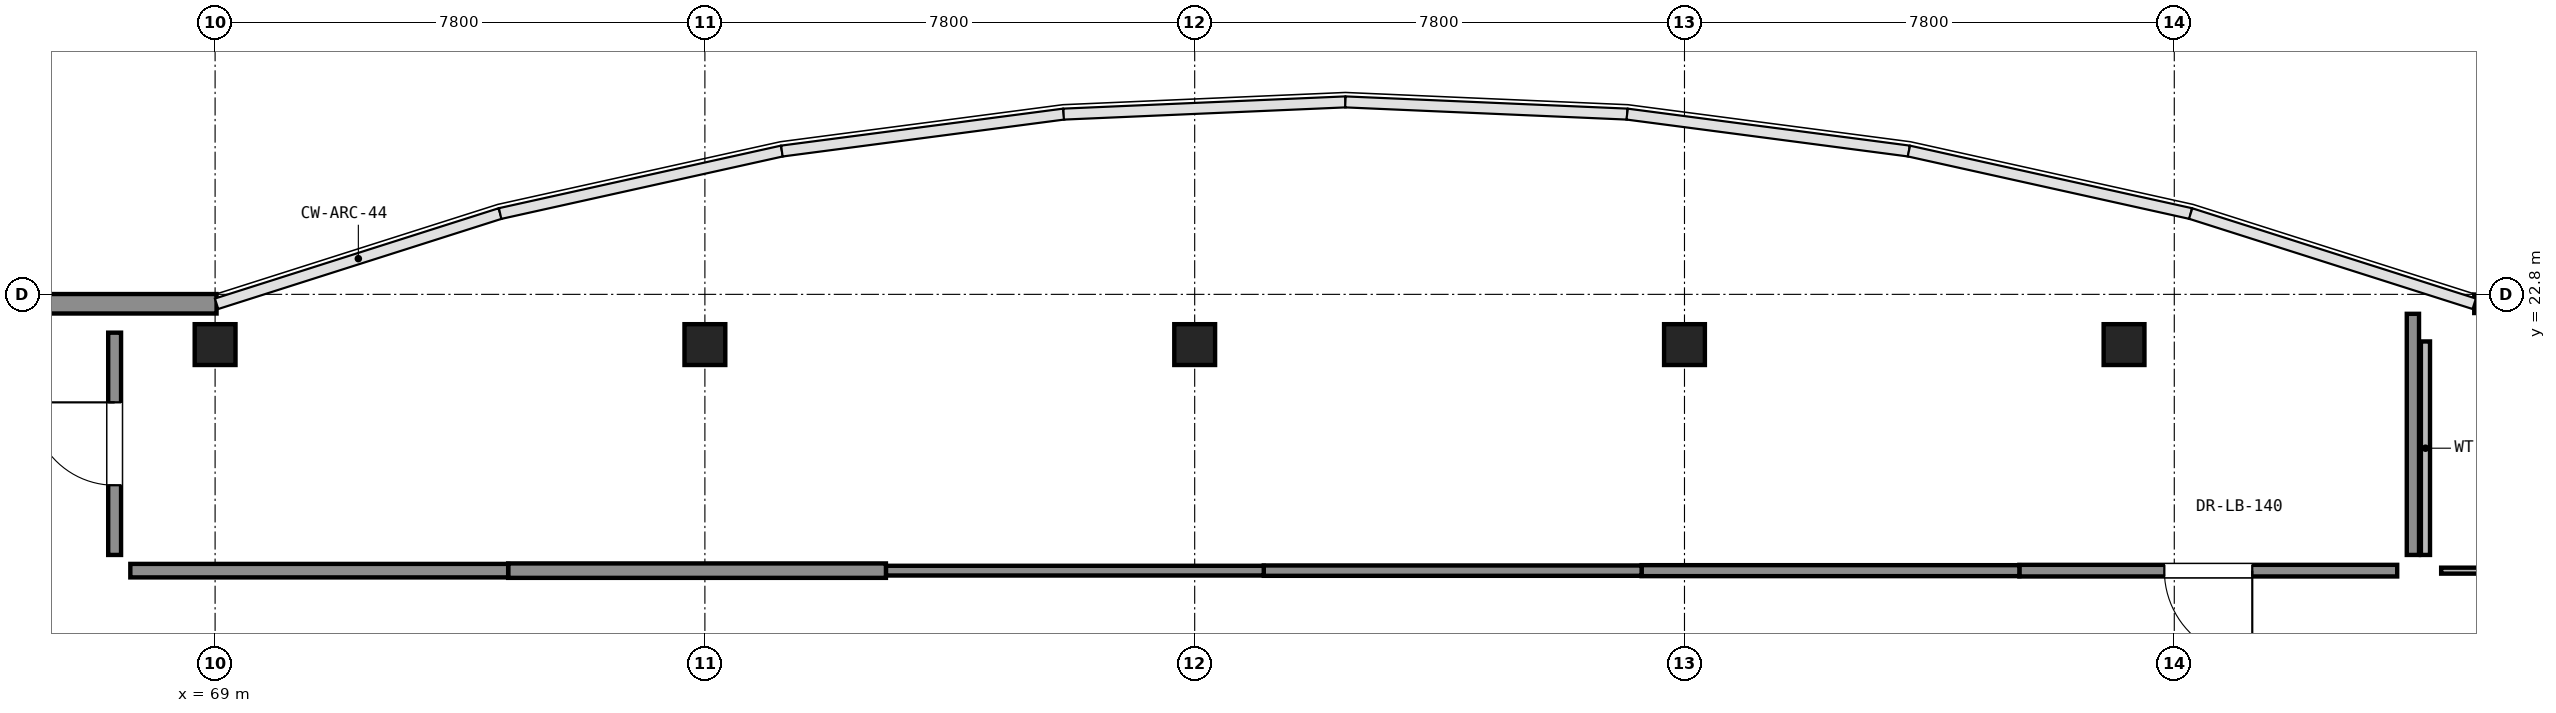
"""IFC4 building model, lengths in metres.
Left out: names, types, materials, properties, quantities, classifications, styles, units other than length and angle.
Written with IfcOpenShell. Run it as: python <this file> out.ifc"""

import sys

from ifc_helpers import new_model, si_unit, direction, frame, frame_2d, origin, origin_2d, place, context, subcontext, project, spatial, rectangle, extrude, element, fill, save


model = new_model("IFC4")
c1 = context("Model", 3, precision=1e-05, world=origin(), true_north=direction((0.0, 1.0)))
c2 = subcontext(c1, "Body", "Model", "MODEL_VIEW")
j1 = project(units=[si_unit("LENGTHUNIT", "METRE"), si_unit("PLANEANGLEUNIT", "RADIAN")], contexts=[c1])
p1 = place(None, origin())
s1 = spatial("IfcSite", under=j1, at=p1, CompositionType="ELEMENT")
p2 = place(p1, origin())
s2 = spatial("IfcBuilding", under=s1, at=p2, CompositionType="ELEMENT")
p3 = place(p2, frame((0.0, 0.0, 5.1)))
s3 = spatial("IfcBuildingStorey", under=s2, at=p3, CompositionType="ELEMENT", Elevation=5.1)
for number, where, z_axis, x_axis in (
    (1, (69.0, 22.0, 0.0), (0.0, 0.0, 1.0), (1.0, 0.0, 0.0)),
    (2, (76.8, 22.0, 0.0), (0.0, 0.0, 1.0), (1.0, 0.0, 0.0)),
    (3, (84.6, 22.0, 0.0), (0.0, 0.0, 1.0), (1.0, 0.0, 0.0)),
    (4, (92.4, 22.0, 0.0), (0.0, 0.0, 1.0), (1.0, 0.0, 0.0)),
    (5, (99.4, 22.0, 0.0), (0.0, 0.0, 1.0), (1.0, 0.0, 0.0)),
):
    element("IfcColumn", number, at=place(p3, frame(where, z_axis=z_axis, x_axis=x_axis)), inside=s3, PredefinedType="COLUMN", context=c2, shape_type="SweptSolid", body=[
        extrude(rectangle(XDim=0.65, YDim=0.65, at=origin_2d()), origin(), (0.0, 0.0, 1.0), 4.42),
    ])
p4 = place(p3, frame((61.337, 22.65, 0.0), z_axis=(0.0, 0.0, 1.0), x_axis=(1.0, 0.0, 0.0)))
e6 = element("IfcWall", 6, at=p4, inside=s3, PredefinedType="SOLIDWALL", context=c2, shape_type="SweptSolid", body=[
    extrude(rectangle(XDim=7.687, YDim=0.31, at=frame_2d((3.843, 0.0))), origin(), (0.0, 0.0, 1.0), 4.105),
])
p5 = place(p4, frame((3.118, 0.0, 0.9)))
e7 = element("IfcOpeningElement", 7, at=p5, cuts=e6, PredefinedType="OPENING", context=c2, shape_type="SweptSolid", body=[
    extrude(rectangle(XDim=1.45, YDim=2.0, at=frame_2d((0.725, 1.0))), frame((0.0, 0.165, 0.0), z_axis=(0.0, -1.0, 0.0), x_axis=(1.0, 0.0, 0.0)), (0.0, 0.0, 1.0), 0.33),
])
p6 = place(p3, frame((104.977, 22.65, 0.0), z_axis=(0.0, 0.0, 1.0), x_axis=(1.0, 0.0, 0.0)))
e8 = element("IfcWall", 8, at=p6, inside=s3, PredefinedType="SOLIDWALL", context=c2, shape_type="SweptSolid", body=[
    extrude(rectangle(XDim=6.158, YDim=0.295, at=frame_2d((3.079, 0.0))), origin(), (0.0, 0.0, 1.0), 4.105),
])
p7 = place(p6, frame((2.279, 0.0, 0.9)))
e9 = element("IfcOpeningElement", 9, at=p7, cuts=e8, PredefinedType="OPENING", context=c2, shape_type="SweptSolid", body=[
    extrude(rectangle(XDim=1.6, YDim=2.0, at=frame_2d((0.8, 1.0))), frame((0.0, 0.157, 0.0), z_axis=(0.0, -1.0, 0.0), x_axis=(1.0, 0.0, 0.0)), (0.0, 0.0, 1.0), 0.315),
])
p8 = place(p3, frame((67.4, 18.65, 0.0), z_axis=(0.0, 0.0, 1.0), x_axis=(0.0, 1.0, 0.0)))
e10 = element("IfcWall", 10, at=p8, inside=s3, PredefinedType="PARTITIONING", context=c2, shape_type="SweptSolid", body=[
    extrude(rectangle(XDim=3.54, YDim=0.205, at=frame_2d((1.77, 0.0))), origin(), (0.0, 0.0, 1.0), 3.555),
])
p9 = place(p8, frame((1.11, 0.0, 0.0)))
e11 = element("IfcOpeningElement", 11, at=p9, cuts=e10, PredefinedType="OPENING", context=c2, shape_type="SweptSolid", body=[
    extrude(rectangle(XDim=1.32, YDim=2.2, at=frame_2d((0.66, 1.1))), frame((0.0, 0.113, 0.0), z_axis=(0.0, -1.0, 0.0), x_axis=(1.0, 0.0, 0.0)), (0.0, 0.0, 1.0), 0.225),
])
p10 = place(p3, frame((104.0, 22.49, 0.0), z_axis=(0.0, 0.0, 1.0), x_axis=(0.0, -1.0, 0.0)))
e12 = element("IfcWall", 12, at=p10, inside=s3, PredefinedType="PARTITIONING", context=c2, shape_type="SweptSolid", body=[
    extrude(rectangle(XDim=3.84, YDim=0.195, at=frame_2d((1.92, 0.0))), origin(), (0.0, 0.0, 1.0), 3.305),
])
p11 = place(p3, frame((103.75, 18.4, 0.0), z_axis=(0.0, 0.0, 1.0), x_axis=(-1.0, 0.0, 0.0)))
e13 = element("IfcWall", 13, at=p11, inside=s3, PredefinedType="PARTITIONING", context=c2, shape_type="SweptSolid", body=[
    extrude(rectangle(XDim=6.017, YDim=0.185, at=frame_2d((3.009, 0.0))), origin(), (0.0, 0.0, 1.0), 3.405),
])
p12 = place(p11, frame((2.308, 0.0, 0.0)))
e14 = element("IfcOpeningElement", 14, at=p12, cuts=e13, PredefinedType="OPENING", context=c2, shape_type="SweptSolid", body=[
    extrude(rectangle(XDim=1.4, YDim=2.2, at=frame_2d((0.7, 1.1))), frame((0.0, 0.103, 0.0), z_axis=(0.0, -1.0, 0.0), x_axis=(1.0, 0.0, 0.0)), (0.0, 0.0, 1.0), 0.205),
])
p13 = place(p3, frame((97.733, 18.4, 0.0), z_axis=(0.0, 0.0, 1.0), x_axis=(-1.0, 0.0, 0.0)))
e15 = element("IfcWall", 15, at=p13, inside=s3, PredefinedType="PARTITIONING", context=c2, shape_type="SweptSolid", body=[
    extrude(rectangle(XDim=6.016, YDim=0.175, at=frame_2d((3.008, 0.0))), origin(), (0.0, 0.0, 1.0), 3.505),
])
p14 = place(p3, frame((91.717, 18.4, 0.0), z_axis=(0.0, 0.0, 1.0), x_axis=(-1.0, 0.0, 0.0)))
e16 = element("IfcWall", 16, at=p14, inside=s3, PredefinedType="PARTITIONING", context=c2, shape_type="SweptSolid", body=[
    extrude(rectangle(XDim=6.017, YDim=0.165, at=frame_2d((3.009, 0.0))), origin(), (0.0, 0.0, 1.0), 4.105),
])
p15 = place(p3, frame((85.7, 18.4, 0.0), z_axis=(0.0, 0.0, 1.0), x_axis=(-1.0, 0.0, 0.0)))
e17 = element("IfcWall", 17, at=p15, inside=s3, PredefinedType="PARTITIONING", context=c2, shape_type="SweptSolid", body=[
    extrude(rectangle(XDim=6.017, YDim=0.155, at=frame_2d((3.008, 0.0))), origin(), (0.0, 0.0, 1.0), 3.305),
])
p16 = place(p3, frame((79.683, 18.4, 0.0), z_axis=(0.0, 0.0, 1.0), x_axis=(-1.0, 0.0, 0.0)))
e18 = element("IfcWall", 18, at=p16, inside=s3, PredefinedType="PARTITIONING", context=c2, shape_type="SweptSolid", body=[
    extrude(rectangle(XDim=6.016, YDim=0.23, at=frame_2d((3.008, 0.0))), origin(), (0.0, 0.0, 1.0), 3.455),
])
p17 = place(p3, frame((73.667, 18.4, 0.0), z_axis=(0.0, 0.0, 1.0), x_axis=(-1.0, 0.0, 0.0)))
e19 = element("IfcWall", 19, at=p17, inside=s3, PredefinedType="PARTITIONING", context=c2, shape_type="SweptSolid", body=[
    extrude(rectangle(XDim=6.017, YDim=0.215, at=frame_2d((3.009, 0.0))), origin(), (0.0, 0.0, 1.0), 3.305),
])
p18 = place(p3, frame((112.75, 18.4, 0.0), z_axis=(0.0, 0.0, 1.0), x_axis=(-1.0, 0.0, 0.0)))
e20 = element("IfcWall", 20, at=p18, inside=s3, PredefinedType="PARTITIONING", context=c2, shape_type="SweptSolid", body=[
    extrude(rectangle(XDim=8.3, YDim=0.095, at=frame_2d((4.15, 0.0))), origin(), (0.0, 0.0, 1.0), 3.555),
])
p19 = place(p18, frame((3.675, 0.0, 0.0)))
e21 = element("IfcOpeningElement", 21, at=p19, cuts=e20, PredefinedType="OPENING", context=c2, shape_type="SweptSolid", body=[
    extrude(rectangle(XDim=0.95, YDim=2.15, at=frame_2d((0.475, 1.075))), frame((0.0, 0.057, 0.0), z_axis=(0.0, -1.0, 0.0), x_axis=(1.0, 0.0, 0.0)), (0.0, 0.0, 1.0), 0.115),
])
p20 = place(p3, frame((104.2, 18.65, 0.0), z_axis=(0.0, 0.0, 1.0), x_axis=(0.0, 1.0, 0.0)))
e22 = element("IfcWall", 22, at=p20, inside=s3, PredefinedType="PARTITIONING", context=c2, shape_type="SweptSolid", body=[
    extrude(rectangle(XDim=3.4, YDim=0.145, at=frame_2d((1.7, 0.0))), origin(), (0.0, 0.0, 1.0), 3.305),
])
p21 = place(p9, origin())
e23 = element("IfcDoor", 23, at=p21, inside=s3, OperationType="SINGLE_SWING_RIGHT", PredefinedType="DOOR", context=c2, shape_type="SweptSolid", body=[
    extrude(rectangle(XDim=1.32, YDim=2.2, at=frame_2d((0.66, 1.1))), frame((0.0, 0.025, 0.0), z_axis=(0.0, -1.0, 0.0), x_axis=(1.0, 0.0, 0.0)), (0.0, 0.0, 1.0), 0.05),
])
fill(e11, e23)
p22 = place(p12, origin())
e24 = element("IfcDoor", 24, at=p22, inside=s3, OperationType="SINGLE_SWING_LEFT", PredefinedType="DOOR", context=c2, shape_type="SweptSolid", body=[
    extrude(rectangle(XDim=1.4, YDim=2.2, at=frame_2d((0.7, 1.1))), frame((0.0, 0.025, 0.0), z_axis=(0.0, -1.0, 0.0), x_axis=(1.0, 0.0, 0.0)), (0.0, 0.0, 1.0), 0.05),
])
fill(e14, e24)
save(model, sys.argv[1])
